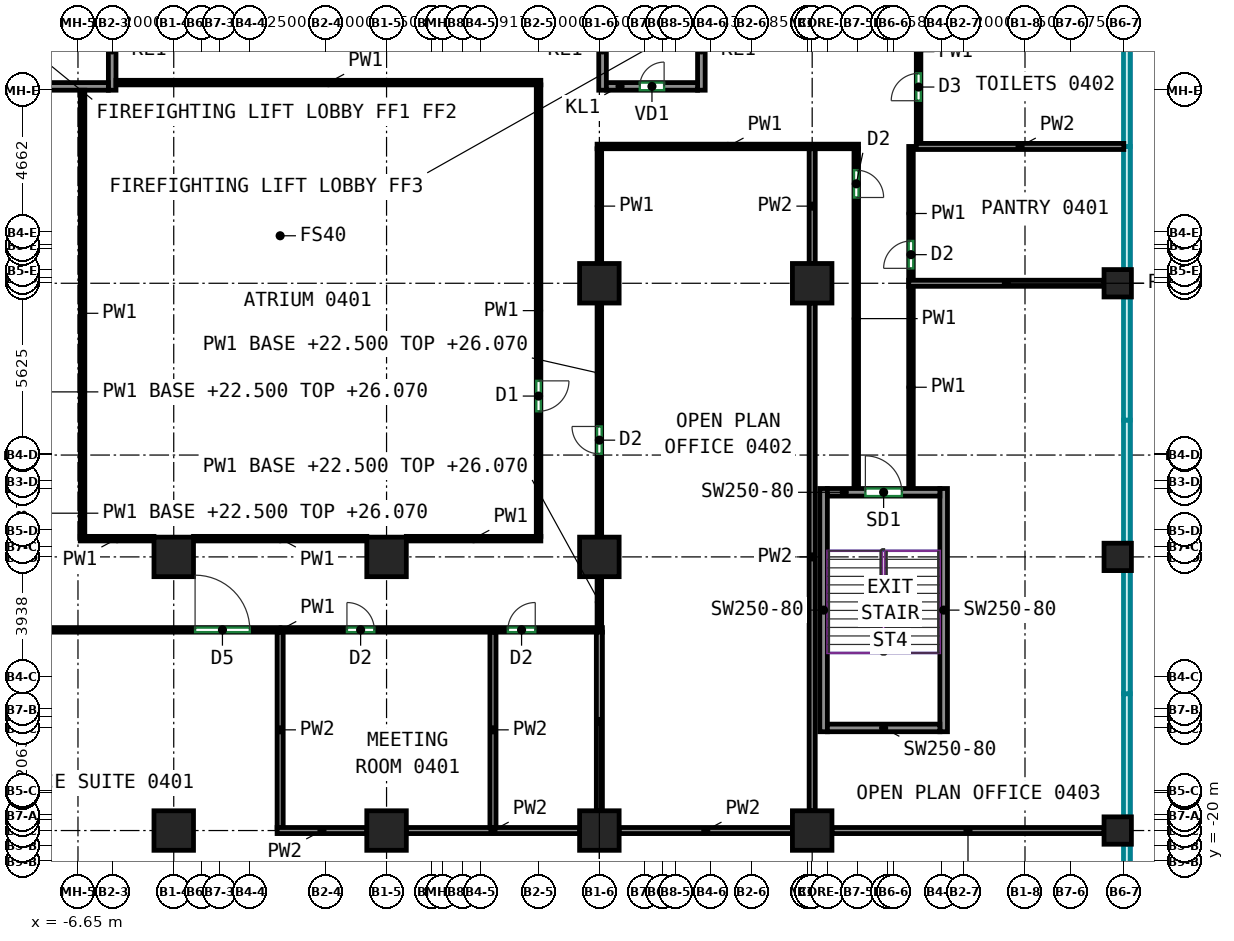
"""IFC4 building model, lengths in metres.
Left out: names, types, materials, properties, quantities, classifications, styles, units other than length and angle.
Written with IfcOpenShell. Run it as: python <this file> out.ifc"""

import sys

from ifc_helpers import new_model, si_unit, direction, frame, frame_2d, origin, origin_2d, place, context, subcontext, project, spatial, rectangle, extrude, source, transform, mapped, element, fill, save


model = new_model("IFC4")
c1 = context("Model", 3, precision=1e-05, world=origin(), true_north=direction((0.0, 1.0)))
c2 = subcontext(c1, "Body", "Model", "MODEL_VIEW")
j1 = project(units=[si_unit("LENGTHUNIT", "METRE"), si_unit("PLANEANGLEUNIT", "RADIAN")], contexts=[c1])
p1 = place(None, origin())
s1 = spatial("IfcSite", under=j1, at=p1, CompositionType="ELEMENT")
p2 = place(p1, origin())
s2 = spatial("IfcBuilding", under=s1, at=p2, CompositionType="ELEMENT")
p3 = place(p2, frame((0.0, 0.0, 22.5)))
s3 = spatial("IfcBuildingStorey", under=s2, at=p3, CompositionType="ELEMENT", Elevation=22.5)
m1 = source(origin(), c2, "Body", "SweptSolid", [
    extrude(rectangle(XDim=1.3, YDim=1.3, at=origin_2d()), origin(), (0.0, 0.0, 1.0), 4.22),
])
for number, where, z_axis, x_axis in (
    (1, (-3.5, -19.0, 0.0), (0.0, 0.0, 1.0), (1.0, 0.0, 0.0)),
    (2, (-3.5, -10.0, 0.0), (0.0, 0.0, 1.0), (1.0, 0.0, 0.0)),
    (3, (3.5, -19.0, 0.0), (0.0, 0.0, 1.0), (1.0, 0.0, 0.0)),
    (4, (3.5, -10.0, 0.0), (0.0, 0.0, 1.0), (1.0, 0.0, 0.0)),
    (5, (10.5, -19.0, 0.0), (0.0, 0.0, 1.0), (1.0, 0.0, 0.0)),
    (6, (10.5, -10.0, 0.0), (0.0, 0.0, 1.0), (1.0, 0.0, 0.0)),
    (7, (10.5, -1.0, 0.0), (0.0, 0.0, 1.0), (1.0, 0.0, 0.0)),
    (8, (17.5, -19.0, 0.0), (0.0, 0.0, 1.0), (1.0, 0.0, 0.0)),
    (9, (17.5, -1.0, 0.0), (0.0, 0.0, 1.0), (1.0, 0.0, 0.0)),
):
    element("IfcColumn", number, at=place(p3, frame(where, z_axis=z_axis, x_axis=x_axis)), inside=s3, PredefinedType="COLUMN", context=c2, shape_type="MappedRepresentation", body=[
        mapped(m1, transform((0.0, 0.0, 0.0))),
    ])
m2 = source(origin(), c2, "Body", "SweptSolid", [
    extrude(rectangle(XDim=0.9, YDim=0.9, at=origin_2d()), origin(), (0.0, 0.0, 1.0), 4.22),
])
for number, where, z_axis, x_axis in (
    (10, (27.55, -19.0, 0.0), (0.0, 0.0, 1.0), (1.0, 0.0, 0.0)),
    (11, (27.55, -10.0, 0.0), (0.0, 0.0, 1.0), (1.0, 0.0, 0.0)),
    (12, (27.55, -1.0, 0.0), (0.0, 0.0, 1.0), (1.0, 0.0, 0.0)),
):
    element("IfcColumn", number, at=place(p3, frame(where, z_axis=z_axis, x_axis=x_axis)), inside=s3, PredefinedType="COLUMN", context=c2, shape_type="MappedRepresentation", body=[
        mapped(m2, transform((0.0, 0.0, 0.0))),
    ])
m3 = source(origin(), c2, "Body", "SweptSolid", [
    extrude(rectangle(XDim=8.0, YDim=0.25, at=frame_2d((4.0, 0.0))), origin(), (0.0, 0.0, 1.0), 4.22),
])
for number, where, z_axis, x_axis in (
    (13, (17.875, -15.75, 0.0), (0.0, 0.0, 1.0), (0.0, 1.0, 0.0)),
    (14, (21.825, -15.75, 0.0), (0.0, 0.0, 1.0), (0.0, 1.0, 0.0)),
):
    element("IfcWall", number, at=place(p3, frame(where, z_axis=z_axis, x_axis=x_axis)), inside=s3, PredefinedType="SHEAR", context=c2, shape_type="MappedRepresentation", body=[
        mapped(m3, transform((0.0, 0.0, 0.0))),
    ])
m4 = source(origin(), c2, "Body", "SweptSolid", [
    extrude(rectangle(XDim=3.7, YDim=0.25, at=frame_2d((1.85, 0.0))), origin(), (0.0, 0.0, 1.0), 4.22),
])
p4 = place(p3, frame((18.0, -15.625, 0.0), z_axis=(0.0, 0.0, 1.0), x_axis=(1.0, 0.0, 0.0)))
e15 = element("IfcWall", 15, at=p4, inside=s3, PredefinedType="SHEAR", context=c2, shape_type="MappedRepresentation", body=[
    mapped(m4, transform((0.0, 0.0, 0.0))),
])
p5 = place(p3, frame((18.0, -7.875, 0.0), z_axis=(0.0, 0.0, 1.0), x_axis=(1.0, 0.0, 0.0)))
e16 = element("IfcWall", 16, at=p5, inside=s3, PredefinedType="SHEAR", context=c2, shape_type="MappedRepresentation", body=[
    mapped(m4, transform((0.0, 0.0, 0.0))),
])
p6 = place(p5, frame((1.25, 0.0, 0.0)))
e17 = element("IfcOpeningElement", 17, at=p6, cuts=e16, PredefinedType="OPENING", context=c2, shape_type="SweptSolid", body=[
    extrude(rectangle(XDim=1.2, YDim=2.1, at=frame_2d((0.6, 1.05))), frame((0.0, 0.135, 0.0), z_axis=(0.0, -1.0, 0.0), x_axis=(1.0, 0.0, 0.0)), (0.0, 0.0, 1.0), 0.27),
])
m5 = source(origin(), c2, "Body", "SweptSolid", [
    extrude(rectangle(XDim=2.65, YDim=0.25, at=frame_2d((1.325, 0.0))), origin(), (0.0, 0.0, 1.0), 4.22),
])
p7 = place(p3, frame((-5.525, 5.35, 0.0), z_axis=(0.0, 0.0, 1.0), x_axis=(0.0, 1.0, 0.0)))
e18 = element("IfcWall", 18, at=p7, inside=s3, PredefinedType="PARTITIONING", context=c2, shape_type="MappedRepresentation", body=[
    mapped(m5, transform((0.0, 0.0, 0.0))),
])
m6 = source(origin(), c2, "Body", "SweptSolid", [
    extrude(rectangle(XDim=5.36, YDim=0.25, at=frame_2d((2.68, 0.0))), origin(), (0.0, 0.0, 1.0), 4.22),
])
p8 = place(p3, frame((-11.01, 5.475, 0.0), z_axis=(0.0, 0.0, 1.0), x_axis=(1.0, 0.0, 0.0)))
e19 = element("IfcWall", 19, at=p8, inside=s3, PredefinedType="PARTITIONING", context=c2, shape_type="MappedRepresentation", body=[
    mapped(m6, transform((0.0, 0.0, 0.0))),
])
p9 = place(p8, frame((2.28, 0.0, 0.0)))
e20 = element("IfcOpeningElement", 20, at=p9, cuts=e19, PredefinedType="OPENING", context=c2, shape_type="SweptSolid", body=[
    extrude(rectangle(XDim=0.8, YDim=2.0, at=frame_2d((0.4, 1.0))), frame((0.0, 0.135, 0.0), z_axis=(0.0, -1.0, 0.0), x_axis=(1.0, 0.0, 0.0)), (0.0, 0.0, 1.0), 0.27),
])
for number, where, z_axis, x_axis in (
    (21, (10.605, 5.35, 0.0), (0.0, 0.0, 1.0), (0.0, 1.0, 0.0)),
    (22, (13.855, 5.35, 0.0), (0.0, 0.0, 1.0), (0.0, 1.0, 0.0)),
):
    element("IfcWall", number, at=place(p3, frame(where, z_axis=z_axis, x_axis=x_axis)), inside=s3, PredefinedType="PARTITIONING", context=c2, shape_type="MappedRepresentation", body=[
        mapped(m5, transform((0.0, 0.0, 0.0))),
    ])
m7 = source(origin(), c2, "Body", "SweptSolid", [
    extrude(rectangle(XDim=3.0, YDim=0.25, at=frame_2d((1.5, 0.0))), origin(), (0.0, 0.0, 1.0), 4.22),
])
p10 = place(p3, frame((10.73, 5.475, 0.0), z_axis=(0.0, 0.0, 1.0), x_axis=(1.0, 0.0, 0.0)))
e23 = element("IfcWall", 23, at=p10, inside=s3, PredefinedType="PARTITIONING", context=c2, shape_type="MappedRepresentation", body=[
    mapped(m7, transform((0.0, 0.0, 0.0))),
])
p11 = place(p10, frame((1.1, 0.0, 0.0)))
e24 = element("IfcOpeningElement", 24, at=p11, cuts=e23, PredefinedType="OPENING", context=c2, shape_type="SweptSolid", body=[
    extrude(rectangle(XDim=0.8, YDim=2.0, at=frame_2d((0.4, 1.0))), frame((0.0, 0.135, 0.0), z_axis=(0.0, -1.0, 0.0), x_axis=(1.0, 0.0, 0.0)), (0.0, 0.0, 1.0), 0.27),
])
p12 = place(p3, frame((-10.575, -12.4, 0.0), z_axis=(0.0, 0.0, 1.0), x_axis=(1.0, 0.0, 0.0)))
e25 = element("IfcWall", 25, at=p12, inside=s3, PredefinedType="PARTITIONING", context=c2, shape_type="SweptSolid", body=[
    extrude(rectangle(XDim=21.175, YDim=0.15, at=frame_2d((10.587, 0.0))), origin(), (0.0, 0.0, 1.0), 4.22),
])
p13 = place(p12, frame((7.777, 0.0, 0.0)))
e26 = element("IfcOpeningElement", 26, at=p13, cuts=e25, PredefinedType="OPENING", context=c2, shape_type="SweptSolid", body=[
    extrude(rectangle(XDim=1.8, YDim=2.1, at=frame_2d((0.9, 1.05))), frame((0.0, 0.085, 0.0), z_axis=(0.0, -1.0, 0.0), x_axis=(1.0, 0.0, 0.0)), (0.0, 0.0, 1.0), 0.17),
])
p14 = place(p12, frame((12.772, 0.0, 0.0)))
e27 = element("IfcOpeningElement", 27, at=p14, cuts=e25, PredefinedType="OPENING", context=c2, shape_type="SweptSolid", body=[
    extrude(rectangle(XDim=0.9, YDim=2.1, at=frame_2d((0.45, 1.05))), frame((0.0, 0.085, 0.0), z_axis=(0.0, -1.0, 0.0), x_axis=(1.0, 0.0, 0.0)), (0.0, 0.0, 1.0), 0.17),
])
p15 = place(p12, frame((18.066, 0.0, 0.0)))
e28 = element("IfcOpeningElement", 28, at=p15, cuts=e25, PredefinedType="OPENING", context=c2, shape_type="SweptSolid", body=[
    extrude(rectangle(XDim=0.9, YDim=2.1, at=frame_2d((0.45, 1.05))), frame((0.0, 0.085, 0.0), z_axis=(0.0, -1.0, 0.0), x_axis=(1.0, 0.0, 0.0)), (0.0, 0.0, 1.0), 0.17),
])
p16 = place(p3, frame((10.425, 3.5, 0.0), z_axis=(0.0, 0.0, 1.0), x_axis=(1.0, 0.0, 0.0)))
e29 = element("IfcWall", 29, at=p16, inside=s3, PredefinedType="PARTITIONING", context=c2, shape_type="SweptSolid", body=[
    extrude(rectangle(XDim=8.6, YDim=0.15, at=frame_2d((4.3, 0.0))), origin(), (0.0, 0.0, 1.0), 4.22),
])
p17 = place(p3, frame((10.5, -0.35, 0.0), z_axis=(0.0, 0.0, 1.0), x_axis=(0.0, 1.0, 0.0)))
e30 = element("IfcWall", 30, at=p17, inside=s3, PredefinedType="PARTITIONING", context=c2, shape_type="SweptSolid", body=[
    extrude(rectangle(XDim=3.775, YDim=0.15, at=frame_2d((1.888, 0.0))), origin(), (0.0, 0.0, 1.0), 4.22),
])
p18 = place(p3, frame((10.5, -9.35, 0.0), z_axis=(0.0, 0.0, 1.0), x_axis=(0.0, 1.0, 0.0)))
e31 = element("IfcWall", 31, at=p18, inside=s3, PredefinedType="PARTITIONING", context=c2, shape_type="SweptSolid", body=[
    extrude(rectangle(XDim=7.7, YDim=0.15, at=frame_2d((3.85, 0.0))), origin(), (0.0, 0.0, 1.0), 3.57),
])
p19 = place(p18, frame((2.74, 0.0, 0.0)))
e32 = element("IfcOpeningElement", 32, at=p19, cuts=e31, PredefinedType="OPENING", context=c2, shape_type="SweptSolid", body=[
    extrude(rectangle(XDim=0.9, YDim=2.1, at=frame_2d((0.45, 1.05))), frame((0.0, 0.085, 0.0), z_axis=(0.0, -1.0, 0.0), x_axis=(1.0, 0.0, 0.0)), (0.0, 0.0, 1.0), 0.17),
])
p20 = place(p3, frame((10.5, -12.325, 0.0), z_axis=(0.0, 0.0, 1.0), x_axis=(0.0, 1.0, 0.0)))
e33 = element("IfcWall", 33, at=p20, inside=s3, PredefinedType="PARTITIONING", context=c2, shape_type="SweptSolid", body=[
    extrude(rectangle(XDim=1.675, YDim=0.15, at=frame_2d((0.837, 0.0))), origin(), (0.0, 0.0, 1.0), 3.57),
])
p21 = place(p3, frame((20.75, -7.75, 0.0), z_axis=(0.0, 0.0, 1.0), x_axis=(0.0, 1.0, 0.0)))
e34 = element("IfcWall", 34, at=p21, inside=s3, PredefinedType="PARTITIONING", context=c2, shape_type="SweptSolid", body=[
    extrude(rectangle(XDim=6.66, YDim=0.15, at=frame_2d((3.33, 0.0))), origin(), (0.0, 0.0, 1.0), 4.22),
])
p22 = place(p3, frame((18.95, 3.425, 0.0), z_axis=(0.0, 0.0, 1.0), x_axis=(0.0, -1.0, 0.0)))
e35 = element("IfcWall", 35, at=p22, inside=s3, PredefinedType="PARTITIONING", context=c2, shape_type="SweptSolid", body=[
    extrude(rectangle(XDim=11.175, YDim=0.15, at=frame_2d((5.587, 0.0))), origin(), (0.0, 0.0, 1.0), 4.22),
])
p23 = place(p22, frame((0.704, 0.0, 0.0)))
e36 = element("IfcOpeningElement", 36, at=p23, cuts=e35, PredefinedType="OPENING", context=c2, shape_type="SweptSolid", body=[
    extrude(rectangle(XDim=0.9, YDim=2.1, at=frame_2d((0.45, 1.05))), frame((0.0, 0.085, 0.0), z_axis=(0.0, -1.0, 0.0), x_axis=(1.0, 0.0, 0.0)), (0.0, 0.0, 1.0), 0.17),
])
p24 = place(p3, frame((20.75, -0.91, 0.0), z_axis=(0.0, 0.0, 1.0), x_axis=(0.0, 1.0, 0.0)))
e37 = element("IfcWall", 37, at=p24, inside=s3, PredefinedType="PARTITIONING", context=c2, shape_type="SweptSolid", body=[
    extrude(rectangle(XDim=4.41, YDim=0.15, at=frame_2d((2.205, 0.0))), origin(), (0.0, 0.0, 1.0), 4.22),
])
p25 = place(p24, frame((0.401, 0.0, 0.0)))
e38 = element("IfcOpeningElement", 38, at=p25, cuts=e37, PredefinedType="OPENING", context=c2, shape_type="SweptSolid", body=[
    extrude(rectangle(XDim=0.9, YDim=2.1, at=frame_2d((0.45, 1.05))), frame((0.0, 0.085, 0.0), z_axis=(0.0, -1.0, 0.0), x_axis=(1.0, 0.0, 0.0)), (0.0, 0.0, 1.0), 0.17),
])
p26 = place(p3, frame((21.0, 3.6, 0.0), z_axis=(0.0, 0.0, 1.0), x_axis=(0.0, 1.0, 0.0)))
e39 = element("IfcWall", 39, at=p26, inside=s3, PredefinedType="PARTITIONING", context=c2, shape_type="SweptSolid", body=[
    extrude(rectangle(XDim=4.31, YDim=0.15, at=frame_2d((2.155, 0.0))), origin(), (0.0, 0.0, 1.0), 4.22),
])
p27 = place(p26, frame((1.404, 0.0, 0.0)))
e40 = element("IfcOpeningElement", 40, at=p27, cuts=e39, PredefinedType="OPENING", context=c2, shape_type="SweptSolid", body=[
    extrude(rectangle(XDim=0.9, YDim=2.1, at=frame_2d((0.45, 1.05))), frame((0.0, 0.085, 0.0), z_axis=(0.0, -1.0, 0.0), x_axis=(1.0, 0.0, 0.0)), (0.0, 0.0, 1.0), 0.17),
])
p28 = place(p3, frame((-6.5, -9.325, 0.0), z_axis=(0.0, 0.0, 1.0), x_axis=(0.0, 1.0, 0.0)))
e41 = element("IfcWall", 41, at=p28, inside=s3, PredefinedType="PARTITIONING", context=c2, shape_type="SweptSolid", body=[
    extrude(rectangle(XDim=14.675, YDim=0.15, at=frame_2d((7.337, 0.0))), origin(), (0.0, 0.0, 1.0), 4.22),
])
p29 = place(p3, frame((-6.575, -9.4, 0.0), z_axis=(0.0, 0.0, 1.0), x_axis=(1.0, 0.0, 0.0)))
e42 = element("IfcWall", 42, at=p29, inside=s3, PredefinedType="PARTITIONING", context=c2, shape_type="SweptSolid", body=[
    extrude(rectangle(XDim=2.425, YDim=0.15, at=frame_2d((1.212, 0.0))), origin(), (0.0, 0.0, 1.0), 4.22),
])
p30 = place(p3, frame((-2.85, -9.4, 0.0), z_axis=(0.0, 0.0, 1.0), x_axis=(1.0, 0.0, 0.0)))
e43 = element("IfcWall", 43, at=p30, inside=s3, PredefinedType="PARTITIONING", context=c2, shape_type="SweptSolid", body=[
    extrude(rectangle(XDim=5.7, YDim=0.15, at=frame_2d((2.85, 0.0))), origin(), (0.0, 0.0, 1.0), 4.22),
])
p31 = place(p3, frame((4.15, -9.4, 0.0), z_axis=(0.0, 0.0, 1.0), x_axis=(1.0, 0.0, 0.0)))
e44 = element("IfcWall", 44, at=p31, inside=s3, PredefinedType="PARTITIONING", context=c2, shape_type="SweptSolid", body=[
    extrude(rectangle(XDim=4.425, YDim=0.15, at=frame_2d((2.212, 0.0))), origin(), (0.0, 0.0, 1.0), 4.22),
])
p32 = place(p3, frame((8.5, 5.525, 0.0), z_axis=(0.0, 0.0, 1.0), x_axis=(0.0, -1.0, 0.0)))
e45 = element("IfcWall", 45, at=p32, inside=s3, PredefinedType="PARTITIONING", context=c2, shape_type="SweptSolid", body=[
    extrude(rectangle(XDim=14.85, YDim=0.15, at=frame_2d((7.425, 0.0))), origin(), (0.0, 0.0, 1.0), 4.22),
])
p33 = place(p32, frame((9.735, 0.0, 0.0)))
e46 = element("IfcOpeningElement", 46, at=p33, cuts=e45, PredefinedType="OPENING", context=c2, shape_type="SweptSolid", body=[
    extrude(rectangle(XDim=1.0, YDim=2.1, at=frame_2d((0.5, 1.05))), frame((0.0, 0.085, 0.0), z_axis=(0.0, -1.0, 0.0), x_axis=(1.0, 0.0, 0.0)), (0.0, 0.0, 1.0), 0.17),
])
p34 = place(p3, frame((-5.4, 5.6, 0.0), z_axis=(0.0, 0.0, 1.0), x_axis=(1.0, 0.0, 0.0)))
e47 = element("IfcWall", 47, at=p34, inside=s3, PredefinedType="PARTITIONING", context=c2, shape_type="SweptSolid", body=[
    extrude(rectangle(XDim=13.975, YDim=0.15, at=frame_2d((6.987, 0.0))), origin(), (0.0, 0.0, 1.0), 4.22),
])
p35 = place(p3, frame((0.0, -18.9, 0.0), z_axis=(0.0, 0.0, 1.0), x_axis=(0.0, 1.0, 0.0)))
e48 = element("IfcWall", 48, at=p35, inside=s3, PredefinedType="PARTITIONING", context=c2, shape_type="SweptSolid", body=[
    extrude(rectangle(XDim=6.424, YDim=0.2, at=frame_2d((3.212, 0.0))), origin(), (0.0, 0.0, 1.0), 4.22),
])
p36 = place(p3, frame((-0.1, -19.0, 0.0), z_axis=(0.0, 0.0, 1.0), x_axis=(1.0, 0.0, 0.0)))
e49 = element("IfcWall", 49, at=p36, inside=s3, PredefinedType="PARTITIONING", context=c2, shape_type="SweptSolid", body=[
    extrude(rectangle(XDim=2.95, YDim=0.2, at=frame_2d((1.475, 0.0))), origin(), (0.0, 0.0, 1.0), 4.22),
])
for number, where, z_axis, x_axis in (
    (50, (4.15, -19.0, 0.0), (0.0, 0.0, 1.0), (1.0, 0.0, 0.0)),
    (51, (11.15, -19.0, 0.0), (0.0, 0.0, 1.0), (1.0, 0.0, 0.0)),
):
    element("IfcWall", number, at=place(p3, frame(where, z_axis=z_axis, x_axis=x_axis)), inside=s3, PredefinedType="PARTITIONING", context=c2, shape_type="SweptSolid", body=[
        extrude(rectangle(XDim=5.7, YDim=0.2, at=frame_2d((2.85, 0.0))), origin(), (0.0, 0.0, 1.0), 4.22),
    ])
p37 = place(p3, frame((18.15, -19.0, 0.0), z_axis=(0.0, 0.0, 1.0), x_axis=(1.0, 0.0, 0.0)))
e52 = element("IfcWall", 52, at=p37, inside=s3, PredefinedType="PARTITIONING", context=c2, shape_type="SweptSolid", body=[
    extrude(rectangle(XDim=8.95, YDim=0.2, at=frame_2d((4.475, 0.0))), origin(), (0.0, 0.0, 1.0), 3.57),
])
p38 = place(p3, frame((7.0, -18.9, 0.0), z_axis=(0.0, 0.0, 1.0), x_axis=(0.0, 1.0, 0.0)))
e53 = element("IfcWall", 53, at=p38, inside=s3, PredefinedType="PARTITIONING", context=c2, shape_type="SweptSolid", body=[
    extrude(rectangle(XDim=6.424, YDim=0.2, at=frame_2d((3.212, 0.0))), origin(), (0.0, 0.0, 1.0), 4.22),
])
p39 = place(p3, frame((10.5, -18.35, 0.0), z_axis=(0.0, 0.0, 1.0), x_axis=(0.0, 1.0, 0.0)))
e54 = element("IfcWall", 54, at=p39, inside=s3, PredefinedType="PARTITIONING", context=c2, shape_type="SweptSolid", body=[
    extrude(rectangle(XDim=5.874, YDim=0.2, at=frame_2d((2.937, 0.0))), origin(), (0.0, 0.0, 1.0), 3.57),
])
p40 = place(p3, frame((17.5, -0.35, 0.0), z_axis=(0.0, 0.0, 1.0), x_axis=(0.0, 1.0, 0.0)))
e55 = element("IfcWall", 55, at=p40, inside=s3, PredefinedType="PARTITIONING", context=c2, shape_type="SweptSolid", body=[
    extrude(rectangle(XDim=3.774, YDim=0.2, at=frame_2d((1.887, 0.0))), origin(), (0.0, 0.0, 1.0), 4.22),
])
p41 = place(p3, frame((17.5, -18.35, 0.0), z_axis=(0.0, 0.0, 1.0), x_axis=(0.0, 1.0, 0.0)))
e56 = element("IfcWall", 56, at=p41, inside=s3, PredefinedType="PARTITIONING", context=c2, shape_type="SweptSolid", body=[
    extrude(rectangle(XDim=16.7, YDim=0.2, at=frame_2d((8.35, 0.0))), origin(), (0.0, 0.0, 1.0), 4.22),
])
p42 = place(p3, frame((20.676, -1.0, 0.0), z_axis=(0.0, 0.0, 1.0), x_axis=(1.0, 0.0, 0.0)))
e57 = element("IfcWall", 57, at=p42, inside=s3, PredefinedType="PARTITIONING", context=c2, shape_type="SweptSolid", body=[
    extrude(rectangle(XDim=6.424, YDim=0.2, at=frame_2d((3.212, 0.0))), origin(), (0.0, 0.0, 1.0), 3.57),
])
p43 = place(p3, frame((27.75, 3.5, 0.0), z_axis=(0.0, 0.0, 1.0), x_axis=(-1.0, 0.0, 0.0)))
e58 = element("IfcWall", 58, at=p43, inside=s3, PredefinedType="PARTITIONING", context=c2, shape_type="SweptSolid", body=[
    extrude(rectangle(XDim=6.824, YDim=0.2, at=frame_2d((3.412, 0.0))), origin(), (0.0, 0.0, 1.0), 4.22),
])
p44 = place(p11, origin())
e59 = element("IfcDoor", 59, at=p44, inside=s3, OperationType="SINGLE_SWING_RIGHT", PredefinedType="DOOR", context=c2, shape_type="SweptSolid", body=[
    extrude(rectangle(XDim=0.8, YDim=2.0, at=frame_2d((0.4, 1.0))), frame((0.0, 0.025, 0.0), z_axis=(0.0, -1.0, 0.0), x_axis=(1.0, 0.0, 0.0)), (0.0, 0.0, 1.0), 0.05),
])
fill(e24, e59)
p45 = place(p6, origin())
e60 = element("IfcDoor", 60, at=p45, inside=s3, OperationType="DOUBLE_DOOR_SINGLE_SWING", PredefinedType="DOOR", context=c2, shape_type="SweptSolid", body=[
    extrude(rectangle(XDim=1.2, YDim=2.1, at=frame_2d((0.6, 1.05))), frame((0.0, 0.025, 0.0), z_axis=(0.0, -1.0, 0.0), x_axis=(1.0, 0.0, 0.0)), (0.0, 0.0, 1.0), 0.05),
])
fill(e17, e60)
p46 = place(p13, origin())
e61 = element("IfcDoor", 61, at=p46, inside=s3, OperationType="DOUBLE_DOOR_SINGLE_SWING", PredefinedType="DOOR", context=c2, shape_type="SweptSolid", body=[
    extrude(rectangle(XDim=1.8, YDim=2.1, at=frame_2d((0.9, 1.05))), frame((0.0, 0.025, 0.0), z_axis=(0.0, -1.0, 0.0), x_axis=(1.0, 0.0, 0.0)), (0.0, 0.0, 1.0), 0.05),
])
fill(e26, e61)
p47 = place(p14, origin())
e62 = element("IfcDoor", 62, at=p47, inside=s3, OperationType="SINGLE_SWING_LEFT", PredefinedType="DOOR", context=c2, shape_type="SweptSolid", body=[
    extrude(rectangle(XDim=0.9, YDim=2.1, at=frame_2d((0.45, 1.05))), frame((0.0, 0.025, 0.0), z_axis=(0.0, -1.0, 0.0), x_axis=(1.0, 0.0, 0.0)), (0.0, 0.0, 1.0), 0.05),
])
fill(e27, e62)
p48 = place(p15, origin())
e63 = element("IfcDoor", 63, at=p48, inside=s3, OperationType="SINGLE_SWING_RIGHT", PredefinedType="DOOR", context=c2, shape_type="SweptSolid", body=[
    extrude(rectangle(XDim=0.9, YDim=2.1, at=frame_2d((0.45, 1.05))), frame((0.0, 0.025, 0.0), z_axis=(0.0, -1.0, 0.0), x_axis=(1.0, 0.0, 0.0)), (0.0, 0.0, 1.0), 0.05),
])
fill(e28, e63)
p49 = place(p19, origin())
e64 = element("IfcDoor", 64, at=p49, inside=s3, OperationType="SINGLE_SWING_RIGHT", PredefinedType="DOOR", context=c2, shape_type="SweptSolid", body=[
    extrude(rectangle(XDim=0.9, YDim=2.1, at=frame_2d((0.45, 1.05))), frame((0.0, 0.025, 0.0), z_axis=(0.0, -1.0, 0.0), x_axis=(1.0, 0.0, 0.0)), (0.0, 0.0, 1.0), 0.05),
])
fill(e32, e64)
p50 = place(p33, origin())
e65 = element("IfcDoor", 65, at=p50, inside=s3, OperationType="SINGLE_SWING_LEFT", PredefinedType="DOOR", context=c2, shape_type="SweptSolid", body=[
    extrude(rectangle(XDim=1.0, YDim=2.1, at=frame_2d((0.5, 1.05))), frame((0.0, 0.025, 0.0), z_axis=(0.0, -1.0, 0.0), x_axis=(1.0, 0.0, 0.0)), (0.0, 0.0, 1.0), 0.05),
])
fill(e46, e65)
p51 = place(p25, origin())
e66 = element("IfcDoor", 66, at=p51, inside=s3, OperationType="SINGLE_SWING_LEFT", PredefinedType="DOOR", context=c2, shape_type="SweptSolid", body=[
    extrude(rectangle(XDim=0.9, YDim=2.1, at=frame_2d((0.45, 1.05))), frame((0.0, 0.025, 0.0), z_axis=(0.0, -1.0, 0.0), x_axis=(1.0, 0.0, 0.0)), (0.0, 0.0, 1.0), 0.05),
])
fill(e38, e66)
p52 = place(p23, origin())
e67 = element("IfcDoor", 67, at=p52, inside=s3, OperationType="SINGLE_SWING_RIGHT", PredefinedType="DOOR", context=c2, shape_type="SweptSolid", body=[
    extrude(rectangle(XDim=0.9, YDim=2.1, at=frame_2d((0.45, 1.05))), frame((0.0, 0.025, 0.0), z_axis=(0.0, -1.0, 0.0), x_axis=(1.0, 0.0, 0.0)), (0.0, 0.0, 1.0), 0.05),
])
fill(e36, e67)
p53 = place(p27, origin())
e68 = element("IfcDoor", 68, at=p53, inside=s3, OperationType="SINGLE_SWING_LEFT", PredefinedType="DOOR", context=c2, shape_type="SweptSolid", body=[
    extrude(rectangle(XDim=0.9, YDim=2.1, at=frame_2d((0.45, 1.05))), frame((0.0, 0.025, 0.0), z_axis=(0.0, -1.0, 0.0), x_axis=(1.0, 0.0, 0.0)), (0.0, 0.0, 1.0), 0.05),
])
fill(e40, e68)
save(model, sys.argv[1])
